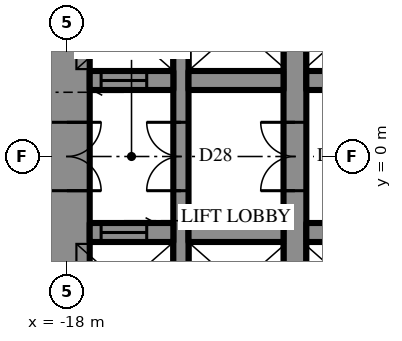
"""IFC4 building model, lengths in metres.
Left out: names, types, materials, properties, quantities, classifications, styles, units other than length and angle.
Written with IfcOpenShell. Run it as: python <this file> out.ifc"""

import sys

from ifc_helpers import new_model, si_unit, direction, frame, frame_2d, origin, place, context, subcontext, project, spatial, rectangle, extrude, element, fill, save


model = new_model("IFC4")
c1 = context("Model", 3, precision=1e-05, world=origin(), true_north=direction((0.0, 1.0)))
c2 = subcontext(c1, "Body", "Model", "MODEL_VIEW")
j1 = project(units=[si_unit("LENGTHUNIT", "METRE"), si_unit("PLANEANGLEUNIT", "RADIAN")], contexts=[c1])
p1 = place(None, origin())
s1 = spatial("IfcSite", under=j1, at=p1, CompositionType="ELEMENT")
p2 = place(p1, origin())
s2 = spatial("IfcBuilding", under=s1, at=p2, CompositionType="ELEMENT")
p3 = place(p2, frame((0.0, 0.0, 114.5)))
s3 = spatial("IfcBuildingStorey", under=s2, at=p3, CompositionType="ELEMENT", Elevation=114.5)
p4 = place(p3, frame((-18.0, 10.7, 0.0), z_axis=(0.0, 0.0, 1.0), x_axis=(0.0, -1.0, 0.0)))
e1 = element("IfcWall", 1, at=p4, inside=s3, PredefinedType="SHEAR", context=c2, shape_type="SweptSolid", body=[
    extrude(rectangle(XDim=21.4, YDim=1.2, at=frame_2d((10.7, 0.0))), origin(), (0.0, 0.0, 1.0), 5.0),
])
p5 = place(p4, frame((9.8, 0.0, 0.0)))
e2 = element("IfcOpeningElement", 2, at=p5, cuts=e1, PredefinedType="OPENING", context=c2, shape_type="SweptSolid", body=[
    extrude(rectangle(XDim=1.8, YDim=2.4, at=frame_2d((0.9, 1.2))), frame((0.0, 0.61, 0.0), z_axis=(0.0, -1.0, 0.0), x_axis=(1.0, 0.0, 0.0)), (0.0, 0.0, 1.0), 1.22),
])
p6 = place(p3, frame((-12.0, -10.7, 0.0), z_axis=(0.0, 0.0, 1.0), x_axis=(0.0, 1.0, 0.0)))
e3 = element("IfcWall", 3, at=p6, inside=s3, PredefinedType="SHEAR", context=c2, shape_type="SweptSolid", body=[
    extrude(rectangle(XDim=21.4, YDim=0.6, at=frame_2d((10.7, 0.0))), origin(), (0.0, 0.0, 1.0), 5.0),
])
p7 = place(p6, frame((9.8, 0.0, 0.0)))
e4 = element("IfcOpeningElement", 4, at=p7, cuts=e3, PredefinedType="OPENING", context=c2, shape_type="SweptSolid", body=[
    extrude(rectangle(XDim=1.8, YDim=2.4, at=frame_2d((0.9, 1.2))), frame((0.0, 0.31, 0.0), z_axis=(0.0, -1.0, 0.0), x_axis=(1.0, 0.0, 0.0)), (0.0, 0.0, 1.0), 0.62),
])
p8 = place(p3, frame((-15.0, -10.7, 0.0), z_axis=(0.0, 0.0, 1.0), x_axis=(0.0, 1.0, 0.0)))
e5 = element("IfcWall", 5, at=p8, inside=s3, PredefinedType="SHEAR", context=c2, shape_type="SweptSolid", body=[
    extrude(rectangle(XDim=21.4, YDim=0.4, at=frame_2d((10.7, 0.0))), origin(), (0.0, 0.0, 1.0), 5.0),
])
p9 = place(p8, frame((9.8, 0.0, 0.0)))
e6 = element("IfcOpeningElement", 6, at=p9, cuts=e5, PredefinedType="OPENING", context=c2, shape_type="SweptSolid", body=[
    extrude(rectangle(XDim=1.8, YDim=2.4, at=frame_2d((0.9, 1.2))), frame((0.0, 0.21, 0.0), z_axis=(0.0, -1.0, 0.0), x_axis=(1.0, 0.0, 0.0)), (0.0, 0.0, 1.0), 0.42),
])
p10 = place(p3, frame((-17.4, 2.0, 0.0), z_axis=(0.0, 0.0, 1.0), x_axis=(1.0, 0.0, 0.0)))
e7 = element("IfcWall", 7, at=p10, inside=s3, PredefinedType="SHEAR", context=c2, shape_type="SweptSolid", body=[
    extrude(rectangle(XDim=2.2, YDim=0.5, at=frame_2d((1.1, 0.0))), origin(), (0.0, 0.0, 1.0), 5.0),
])
p11 = place(p10, frame((0.3, 0.0, 0.0)))
e8 = element("IfcOpeningElement", 8, at=p11, cuts=e7, PredefinedType="OPENING", context=c2, shape_type="SweptSolid", body=[
    extrude(rectangle(XDim=1.2, YDim=2.2, at=frame_2d((0.6, 1.1))), frame((0.0, 0.26, 0.0), z_axis=(0.0, -1.0, 0.0), x_axis=(1.0, 0.0, 0.0)), (0.0, 0.0, 1.0), 0.52),
])
p12 = place(p3, frame((-14.8, 2.0, 0.0), z_axis=(0.0, 0.0, 1.0), x_axis=(1.0, 0.0, 0.0)))
e9 = element("IfcWall", 9, at=p12, inside=s3, PredefinedType="SHEAR", context=c2, shape_type="SweptSolid", body=[
    extrude(rectangle(XDim=2.5, YDim=0.5, at=frame_2d((1.25, 0.0))), origin(), (0.0, 0.0, 1.0), 5.0),
])
p13 = place(p3, frame((-11.7, 2.0, 0.0), z_axis=(0.0, 0.0, 1.0), x_axis=(1.0, 0.0, 0.0)))
e10 = element("IfcWall", 10, at=p13, inside=s3, PredefinedType="SHEAR", context=c2, shape_type="SweptSolid", body=[
    extrude(rectangle(XDim=5.9, YDim=0.5, at=frame_2d((2.95, 0.0))), origin(), (0.0, 0.0, 1.0), 5.0),
])
p14 = place(p3, frame((3.2, -2.0, 0.0), z_axis=(0.0, 0.0, 1.0), x_axis=(-1.0, 0.0, 0.0)))
e11 = element("IfcWall", 11, at=p14, inside=s3, PredefinedType="SHEAR", context=c2, shape_type="SweptSolid", body=[
    extrude(rectangle(XDim=14.9, YDim=0.5, at=frame_2d((7.45, 0.0))), origin(), (0.0, 0.0, 1.0), 5.0),
])
p15 = place(p14, frame((1.15, 0.0, 0.0)))
e12 = element("IfcOpeningElement", 12, at=p15, cuts=e11, PredefinedType="OPENING", context=c2, shape_type="SweptSolid", body=[
    extrude(rectangle(XDim=1.1, YDim=2.2, at=frame_2d((0.55, 1.1))), frame((0.0, 0.26, 0.0), z_axis=(0.0, -1.0, 0.0), x_axis=(1.0, 0.0, 0.0)), (0.0, 0.0, 1.0), 0.52),
])
p16 = place(p14, frame((4.15, 0.0, 0.0)))
e13 = element("IfcOpeningElement", 13, at=p16, cuts=e11, PredefinedType="OPENING", context=c2, shape_type="SweptSolid", body=[
    extrude(rectangle(XDim=1.1, YDim=2.2, at=frame_2d((0.55, 1.1))), frame((0.0, 0.26, 0.0), z_axis=(0.0, -1.0, 0.0), x_axis=(1.0, 0.0, 0.0)), (0.0, 0.0, 1.0), 0.52),
])
p17 = place(p14, frame((7.15, 0.0, 0.0)))
e14 = element("IfcOpeningElement", 14, at=p17, cuts=e11, PredefinedType="OPENING", context=c2, shape_type="SweptSolid", body=[
    extrude(rectangle(XDim=1.1, YDim=2.2, at=frame_2d((0.55, 1.1))), frame((0.0, 0.26, 0.0), z_axis=(0.0, -1.0, 0.0), x_axis=(1.0, 0.0, 0.0)), (0.0, 0.0, 1.0), 0.52),
])
p18 = place(p14, frame((10.15, 0.0, 0.0)))
e15 = element("IfcOpeningElement", 15, at=p18, cuts=e11, PredefinedType="OPENING", context=c2, shape_type="SweptSolid", body=[
    extrude(rectangle(XDim=1.1, YDim=2.2, at=frame_2d((0.55, 1.1))), frame((0.0, 0.26, 0.0), z_axis=(0.0, -1.0, 0.0), x_axis=(1.0, 0.0, 0.0)), (0.0, 0.0, 1.0), 0.52),
])
p19 = place(p3, frame((-12.3, -2.0, 0.0), z_axis=(0.0, 0.0, 1.0), x_axis=(-1.0, 0.0, 0.0)))
e16 = element("IfcWall", 16, at=p19, inside=s3, PredefinedType="SHEAR", context=c2, shape_type="SweptSolid", body=[
    extrude(rectangle(XDim=2.5, YDim=0.5, at=frame_2d((1.25, 0.0))), origin(), (0.0, 0.0, 1.0), 5.0),
])
p20 = place(p3, frame((-15.2, -2.0, 0.0), z_axis=(0.0, 0.0, 1.0), x_axis=(-1.0, 0.0, 0.0)))
e17 = element("IfcWall", 17, at=p20, inside=s3, PredefinedType="SHEAR", context=c2, shape_type="SweptSolid", body=[
    extrude(rectangle(XDim=2.2, YDim=0.5, at=frame_2d((1.1, 0.0))), origin(), (0.0, 0.0, 1.0), 5.0),
])
p21 = place(p20, frame((0.7, 0.0, 0.0)))
e18 = element("IfcOpeningElement", 18, at=p21, cuts=e17, PredefinedType="OPENING", context=c2, shape_type="SweptSolid", body=[
    extrude(rectangle(XDim=1.2, YDim=2.2, at=frame_2d((0.6, 1.1))), frame((0.0, 0.26, 0.0), z_axis=(0.0, -1.0, 0.0), x_axis=(1.0, 0.0, 0.0)), (0.0, 0.0, 1.0), 0.52),
])
p22 = place(p5, origin())
e19 = element("IfcDoor", 19, at=p22, inside=s3, OperationType="DOUBLE_DOOR_SINGLE_SWING", PredefinedType="DOOR", context=c2, shape_type="SweptSolid", body=[
    extrude(rectangle(XDim=1.8, YDim=2.4, at=frame_2d((0.9, 1.2))), frame((0.0, 0.025, 0.0), z_axis=(0.0, -1.0, 0.0), x_axis=(1.0, 0.0, 0.0)), (0.0, 0.0, 1.0), 0.05),
])
fill(e2, e19)
p23 = place(p7, origin())
e20 = element("IfcDoor", 20, at=p23, inside=s3, OperationType="DOUBLE_DOOR_SINGLE_SWING", PredefinedType="DOOR", context=c2, shape_type="SweptSolid", body=[
    extrude(rectangle(XDim=1.8, YDim=2.4, at=frame_2d((0.9, 1.2))), frame((0.0, 0.025, 0.0), z_axis=(0.0, -1.0, 0.0), x_axis=(1.0, 0.0, 0.0)), (0.0, 0.0, 1.0), 0.05),
])
fill(e4, e20)
p24 = place(p9, origin())
e21 = element("IfcDoor", 21, at=p24, inside=s3, OperationType="DOUBLE_DOOR_SINGLE_SWING", PredefinedType="DOOR", context=c2, shape_type="SweptSolid", body=[
    extrude(rectangle(XDim=1.8, YDim=2.4, at=frame_2d((0.9, 1.2))), frame((0.0, 0.025, 0.0), z_axis=(0.0, -1.0, 0.0), x_axis=(1.0, 0.0, 0.0)), (0.0, 0.0, 1.0), 0.05),
])
fill(e6, e21)
p25 = place(p11, frame((1.2, 0.0, 0.0), z_axis=(0.0, 0.0, 1.0), x_axis=(-1.0, 0.0, 0.0)))
e22 = element("IfcDoor", 22, at=p25, inside=s3, OperationType="SLIDING_TO_LEFT", PredefinedType="DOOR", context=c2, shape_type="SweptSolid", body=[
    extrude(rectangle(XDim=1.2, YDim=2.2, at=frame_2d((0.6, 1.1))), frame((0.0, 0.025, 0.0), z_axis=(0.0, -1.0, 0.0), x_axis=(1.0, 0.0, 0.0)), (0.0, 0.0, 1.0), 0.05),
])
fill(e8, e22)
p26 = place(p21, frame((1.2, 0.0, 0.0), z_axis=(0.0, 0.0, 1.0), x_axis=(-1.0, 0.0, 0.0)))
e23 = element("IfcDoor", 23, at=p26, inside=s3, OperationType="SLIDING_TO_LEFT", PredefinedType="DOOR", context=c2, shape_type="SweptSolid", body=[
    extrude(rectangle(XDim=1.2, YDim=2.2, at=frame_2d((0.6, 1.1))), frame((0.0, 0.025, 0.0), z_axis=(0.0, -1.0, 0.0), x_axis=(1.0, 0.0, 0.0)), (0.0, 0.0, 1.0), 0.05),
])
fill(e18, e23)
save(model, sys.argv[1])
